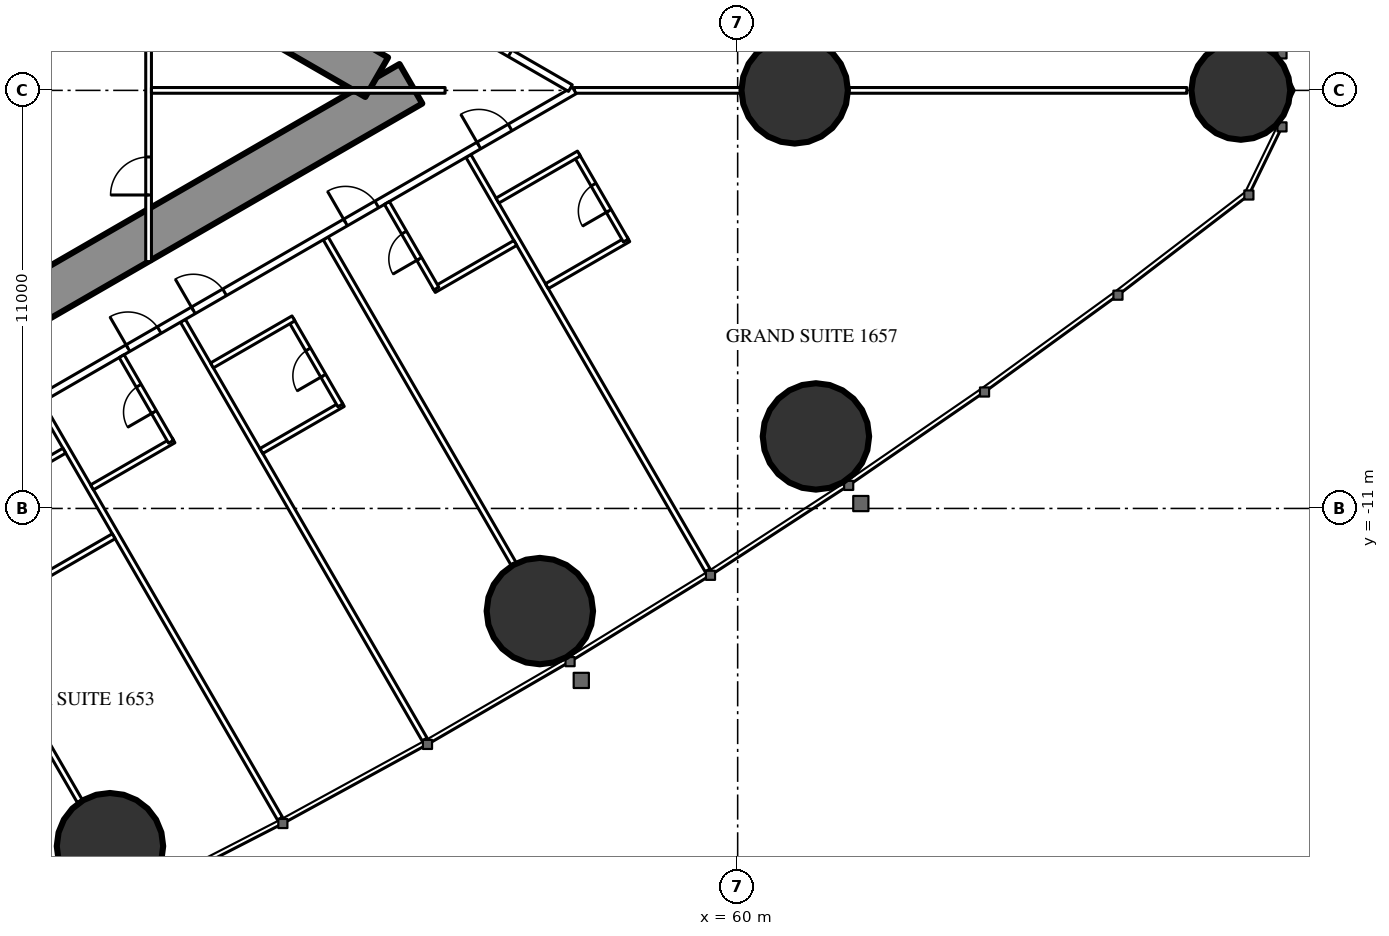
"""IFC4 building model, lengths in metres.
Left out: names, types, materials, properties, quantities, classifications, styles, units other than length and angle.
Written with IfcOpenShell. Run it as: python <this file> out.ifc"""

import sys

from ifc_helpers import new_model, si_unit, direction, frame, frame_2d, origin, origin_2d, place, context, subcontext, project, spatial, rectangle, hollow_circle, extrude, element, fill, save


model = new_model("IFC4")
c1 = context("Model", 3, precision=1e-05, world=origin(), true_north=direction((0.0, 1.0)))
c2 = subcontext(c1, "Body", "Model", "MODEL_VIEW")
j1 = project(units=[si_unit("LENGTHUNIT", "METRE"), si_unit("PLANEANGLEUNIT", "RADIAN")], contexts=[c1])
p1 = place(None, origin())
s1 = spatial("IfcSite", under=j1, at=p1, CompositionType="ELEMENT")
p2 = place(p1, origin())
s2 = spatial("IfcBuilding", under=s1, at=p2, CompositionType="ELEMENT")
p3 = place(p2, frame((0.0, 0.0, 63.5)))
s3 = spatial("IfcBuildingStorey", under=s2, at=p3, CompositionType="ELEMENT", Elevation=63.5)
p4 = place(p3, frame((73.239, 0.0, 0.0), z_axis=(0.0, 0.0, 1.0), x_axis=(1.0, 0.0, 0.0)))
e1 = element("IfcColumn", 1, at=p4, inside=s3, PredefinedType="COLUMN", context=c2, shape_type="SweptSolid", body=[
    extrude(hollow_circle(Radius=1.3, WallThickness=0.1, at=origin_2d()), origin(), (0.0, 0.0, 1.0), 3.5),
])
for number, where, z_axis, x_axis in (
    (2, (43.484, -19.886, 0.0), (0.0, 0.0, 1.0), (1.0, 0.0, 0.0)),
    (3, (54.795, -13.701, 0.0), (0.0, 0.0, 1.0), (1.0, 0.0, 0.0)),
    (4, (62.059, -9.105, 0.0), (0.0, 0.0, 1.0), (1.0, 0.0, 0.0)),
):
    element("IfcColumn", number, at=place(p3, frame(where, z_axis=z_axis, x_axis=x_axis)), inside=s3, PredefinedType="COLUMN", context=c2, shape_type="SweptSolid", body=[
        extrude(hollow_circle(Radius=1.4, WallThickness=0.12, at=origin_2d()), origin(), (0.0, 0.0, 1.0), 3.5),
    ])
p5 = place(p3, frame((61.5, 0.0, 0.0), z_axis=(0.0, 0.0, 1.0), x_axis=(1.0, 0.0, 0.0)))
e5 = element("IfcColumn", 5, at=p5, inside=s3, PredefinedType="COLUMN", context=c2, shape_type="SweptSolid", body=[
    extrude(hollow_circle(Radius=1.4, WallThickness=0.1, at=origin_2d()), origin(), (0.0, 0.0, 1.0), 3.5),
])
p6 = place(p3, frame((27.2, -13.8, 0.0), z_axis=(0.0, 0.0, 1.0), x_axis=(0.866027159892, 0.499996958321, 0.0)))
e6 = element("IfcWall", 6, at=p6, inside=s3, PredefinedType="SHEAR", context=c2, shape_type="SweptSolid", body=[
    extrude(rectangle(XDim=27.947, YDim=1.2, at=frame_2d((13.973, 0.0))), origin(), (0.0, 0.0, 1.0), 3.5),
])
p7 = place(p6, frame((4.6, 0.0, 0.0)))
e7 = element("IfcOpeningElement", 7, at=p7, cuts=e6, PredefinedType="OPENING", context=c2, shape_type="SweptSolid", body=[
    extrude(rectangle(XDim=1.0, YDim=2.2, at=frame_2d((0.5, 1.1))), frame((0.0, 0.61, 0.0), z_axis=(0.0, -1.0, 0.0), x_axis=(1.0, 0.0, 0.0)), (0.0, 0.0, 1.0), 1.22),
])
p8 = place(p6, frame((13.395, 0.0, 0.0)))
e8 = element("IfcOpeningElement", 8, at=p8, cuts=e6, PredefinedType="OPENING", context=c2, shape_type="SweptSolid", body=[
    extrude(rectangle(XDim=1.8, YDim=2.2, at=frame_2d((0.9, 1.1))), frame((0.0, 0.61, 0.0), z_axis=(0.0, -1.0, 0.0), x_axis=(1.0, 0.0, 0.0)), (0.0, 0.0, 1.0), 1.22),
])
p9 = place(p3, frame((27.2, 13.8, 0.0), z_axis=(0.0, 0.0, 1.0), x_axis=(0.866024515034, -0.500001539357, 0.0)))
e9 = element("IfcWall", 9, at=p9, inside=s3, PredefinedType="SHEAR", context=c2, shape_type="SweptSolid", body=[
    extrude(rectangle(XDim=26.907, YDim=1.2, at=frame_2d((13.454, 0.0))), origin(), (0.0, 0.0, 1.0), 3.5),
])
p10 = place(p9, frame((4.6, 0.0, 0.0)))
e10 = element("IfcOpeningElement", 10, at=p10, cuts=e9, PredefinedType="OPENING", context=c2, shape_type="SweptSolid", body=[
    extrude(rectangle(XDim=1.0, YDim=2.2, at=frame_2d((0.5, 1.1))), frame((0.0, 0.61, 0.0), z_axis=(0.0, -1.0, 0.0), x_axis=(1.0, 0.0, 0.0)), (0.0, 0.0, 1.0), 1.22),
])
p11 = place(p9, frame((13.395, 0.0, 0.0)))
e11 = element("IfcOpeningElement", 11, at=p11, cuts=e9, PredefinedType="OPENING", context=c2, shape_type="SweptSolid", body=[
    extrude(rectangle(XDim=1.8, YDim=2.2, at=frame_2d((0.9, 1.1))), frame((0.0, 0.61, 0.0), z_axis=(0.0, -1.0, 0.0), x_axis=(1.0, 0.0, 0.0)), (0.0, 0.0, 1.0), 1.22),
])
p12 = place(p3, frame((41.647, -8.23, 0.0), z_axis=(0.0, 0.0, 1.0), x_axis=(0.49998590462, -0.866033541603, 0.0)))
e12 = element("IfcWall", 12, at=p12, inside=s3, PredefinedType="PARTITIONING", context=c2, shape_type="SweptSolid", body=[
    extrude(rectangle(XDim=12.621, YDim=0.15, at=frame_2d((6.311, 0.0))), origin(), (0.0, 0.0, 1.0), 3.25),
])
p13 = place(p3, frame((45.403, -6.062, 0.0), z_axis=(0.0, 0.0, 1.0), x_axis=(0.500007077968, -0.866021317279, 0.0)))
e13 = element("IfcWall", 13, at=p13, inside=s3, PredefinedType="PARTITIONING", context=c2, shape_type="SweptSolid", body=[
    extrude(rectangle(XDim=12.721, YDim=0.15, at=frame_2d((6.361, 0.0))), origin(), (0.0, 0.0, 1.0), 3.25),
])
p14 = place(p3, frame((49.159, -3.893, 0.0), z_axis=(0.0, 0.0, 1.0), x_axis=(0.499998773722, -0.866026111775, 0.0)))
e14 = element("IfcWall", 14, at=p14, inside=s3, PredefinedType="PARTITIONING", context=c2, shape_type="SweptSolid", body=[
    extrude(rectangle(XDim=9.892, YDim=0.15, at=frame_2d((4.946, 0.0))), origin(), (0.0, 0.0, 1.0), 2.25),
])
p15 = place(p3, frame((52.915, -1.725, 0.0), z_axis=(0.0, 0.0, 1.0), x_axis=(0.499997163113, -0.866027041656, 0.0)))
e15 = element("IfcWall", 15, at=p15, inside=s3, PredefinedType="PARTITIONING", context=c2, shape_type="SweptSolid", body=[
    extrude(rectangle(XDim=12.591, YDim=0.15, at=frame_2d((6.295, 0.0))), origin(), (0.0, 0.0, 1.0), 3.25),
])
p16 = place(p3, frame((55.702, 0.0, 0.0), z_axis=(0.0, 0.0, 1.0), x_axis=(1.0, 0.0, 0.0)))
e16 = element("IfcWall", 16, at=p16, inside=s3, PredefinedType="PARTITIONING", context=c2, shape_type="SweptSolid", body=[
    extrude(rectangle(XDim=16.117, YDim=0.15, at=frame_2d((8.059, 0.0))), origin(), (0.0, 0.0, 1.0), 2.25),
])
p17 = place(p3, frame((40.57, -15.03, 0.0), z_axis=(0.0, 0.0, 1.0), x_axis=(0.500012993597, -0.866017901798, 0.0)))
e17 = element("IfcWall", 17, at=p17, inside=s3, PredefinedType="PARTITIONING", context=c2, shape_type="SweptSolid", body=[
    extrude(rectangle(XDim=4.243, YDim=0.15, at=frame_2d((2.122, 0.0))), origin(), (0.0, 0.0, 1.0), 3.25),
])
p18 = place(p3, frame((37.96, -10.243, 0.0), z_axis=(0.0, 0.0, 1.0), x_axis=(0.866026429433, 0.499998223521, 0.0)))
e18 = element("IfcWall", 18, at=p18, inside=s3, PredefinedType="PARTITIONING", context=c2, shape_type="SweptSolid", body=[
    extrude(rectangle(XDim=20.487, YDim=0.2, at=frame_2d((10.243, 0.0))), origin(), (0.0, 0.0, 1.0), 3.25),
])
p19 = place(p18, frame((6.925, 0.0, 0.0)))
e19 = element("IfcOpeningElement", 19, at=p19, cuts=e18, PredefinedType="OPENING", context=c2, shape_type="SweptSolid", body=[
    extrude(rectangle(XDim=0.95, YDim=2.2, at=frame_2d((0.475, 1.1))), frame((0.0, 0.11, 0.0), z_axis=(0.0, -1.0, 0.0), x_axis=(1.0, 0.0, 0.0)), (0.0, 0.0, 1.0), 0.22),
])
p20 = place(p18, frame((8.912, 0.0, 0.0)))
e20 = element("IfcOpeningElement", 20, at=p20, cuts=e18, PredefinedType="OPENING", context=c2, shape_type="SweptSolid", body=[
    extrude(rectangle(XDim=0.95, YDim=2.2, at=frame_2d((0.475, 1.1))), frame((0.0, 0.11, 0.0), z_axis=(0.0, -1.0, 0.0), x_axis=(1.0, 0.0, 0.0)), (0.0, 0.0, 1.0), 0.22),
])
p21 = place(p18, frame((13.535, 0.0, 0.0)))
e21 = element("IfcOpeningElement", 21, at=p21, cuts=e18, PredefinedType="OPENING", context=c2, shape_type="SweptSolid", body=[
    extrude(rectangle(XDim=0.95, YDim=2.2, at=frame_2d((0.475, 1.1))), frame((0.0, 0.11, 0.0), z_axis=(0.0, -1.0, 0.0), x_axis=(1.0, 0.0, 0.0)), (0.0, 0.0, 1.0), 0.22),
])
p22 = place(p18, frame((17.585, 0.0, 0.0)))
e22 = element("IfcOpeningElement", 22, at=p22, cuts=e18, PredefinedType="OPENING", context=c2, shape_type="SweptSolid", body=[
    extrude(rectangle(XDim=0.95, YDim=2.2, at=frame_2d((0.475, 1.1))), frame((0.0, 0.11, 0.0), z_axis=(0.0, -1.0, 0.0), x_axis=(1.0, 0.0, 0.0)), (0.0, 0.0, 1.0), 0.22),
])
p23 = place(p18, frame((2.875, 0.0, 0.0)))
e23 = element("IfcOpeningElement", 23, at=p23, cuts=e18, PredefinedType="OPENING", context=c2, shape_type="SweptSolid", body=[
    extrude(rectangle(XDim=0.95, YDim=2.2, at=frame_2d((0.475, 1.1))), frame((0.0, 0.11, 0.0), z_axis=(0.0, -1.0, 0.0), x_axis=(1.0, 0.0, 0.0)), (0.0, 0.0, 1.0), 0.22),
])
p24 = place(p3, frame((41.619, 8.131, 0.0), z_axis=(0.0, 0.0, 1.0), x_axis=(0.86603245327, -0.499987789734, 0.0)))
e24 = element("IfcWall", 24, at=p24, inside=s3, PredefinedType="PARTITIONING", context=c2, shape_type="SweptSolid", body=[
    extrude(rectangle(XDim=16.142, YDim=0.2, at=frame_2d((8.071, 0.0))), origin(), (0.0, 0.0, 1.0), 3.25),
])
p25 = place(p24, frame((13.36, 0.0, 0.0)))
e25 = element("IfcOpeningElement", 25, at=p25, cuts=e24, PredefinedType="OPENING", context=c2, shape_type="SweptSolid", body=[
    extrude(rectangle(XDim=0.95, YDim=2.2, at=frame_2d((0.475, 1.1))), frame((0.0, 0.11, 0.0), z_axis=(0.0, -1.0, 0.0), x_axis=(1.0, 0.0, 0.0)), (0.0, 0.0, 1.0), 0.22),
])
p26 = place(p24, frame((4.687, 0.0, 0.0)))
e26 = element("IfcOpeningElement", 26, at=p26, cuts=e24, PredefinedType="OPENING", context=c2, shape_type="SweptSolid", body=[
    extrude(rectangle(XDim=0.95, YDim=2.2, at=frame_2d((0.475, 1.1))), frame((0.0, 0.11, 0.0), z_axis=(0.0, -1.0, 0.0), x_axis=(1.0, 0.0, 0.0)), (0.0, 0.0, 1.0), 0.22),
])
p27 = place(p24, frame((2.987, 0.0, 0.0)))
e27 = element("IfcOpeningElement", 27, at=p27, cuts=e24, PredefinedType="OPENING", context=c2, shape_type="SweptSolid", body=[
    extrude(rectangle(XDim=0.95, YDim=2.2, at=frame_2d((0.475, 1.1))), frame((0.0, 0.11, 0.0), z_axis=(0.0, -1.0, 0.0), x_axis=(1.0, 0.0, 0.0)), (0.0, 0.0, 1.0), 0.22),
])
p28 = place(p3, frame((43.012, -10.444, 0.0), z_axis=(0.0, 0.0, 1.0), x_axis=(0.866031185235, 0.4999899861, 0.0)))
e28 = element("IfcWall", 28, at=p28, inside=s3, PredefinedType="PARTITIONING", context=c2, shape_type="SweptSolid", body=[
    extrude(rectangle(XDim=2.475, YDim=0.15, at=frame_2d((1.238, 0.0))), origin(), (0.0, 0.0, 1.0), 3.25),
])
p29 = place(p3, frame((43.791, -6.993, 0.0), z_axis=(0.0, 0.0, 1.0), x_axis=(0.500047596559, -0.865997922154, 0.0)))
e29 = element("IfcWall", 29, at=p29, inside=s3, PredefinedType="PARTITIONING", context=c2, shape_type="SweptSolid", body=[
    extrude(rectangle(XDim=2.6, YDim=0.15, at=frame_2d((1.3, 0.0))), origin(), (0.0, 0.0, 1.0), 3.25),
])
p30 = place(p29, frame((0.9, 0.0, 0.0)))
e30 = element("IfcOpeningElement", 30, at=p30, cuts=e29, PredefinedType="OPENING", context=c2, shape_type="SweptSolid", body=[
    extrude(rectangle(XDim=0.8, YDim=2.2, at=frame_2d((0.4, 1.1))), frame((0.0, 0.085, 0.0), z_axis=(0.0, -1.0, 0.0), x_axis=(1.0, 0.0, 0.0)), (0.0, 0.0, 1.0), 0.17),
])
p31 = place(p3, frame((47.468, -9.488, 0.0), z_axis=(0.0, 0.0, 1.0), x_axis=(0.86604923931, 0.499958713387, 0.0)))
e31 = element("IfcWall", 31, at=p31, inside=s3, PredefinedType="PARTITIONING", context=c2, shape_type="SweptSolid", body=[
    extrude(rectangle(XDim=2.475, YDim=0.15, at=frame_2d((1.237, 0.0))), origin(), (0.0, 0.0, 1.0), 3.25),
])
p32 = place(p3, frame((48.246, -6.037, 0.0), z_axis=(0.0, 0.0, 1.0), x_axis=(0.500006934395, -0.866021400173, 0.0)))
e32 = element("IfcWall", 32, at=p32, inside=s3, PredefinedType="PARTITIONING", context=c2, shape_type="SweptSolid", body=[
    extrude(rectangle(XDim=2.6, YDim=0.15, at=frame_2d((1.3, 0.0))), origin(), (0.0, 0.0, 1.0), 3.25),
])
p33 = place(p32, frame((0.9, 0.0, 0.0)))
e33 = element("IfcOpeningElement", 33, at=p33, cuts=e32, PredefinedType="OPENING", context=c2, shape_type="SweptSolid", body=[
    extrude(rectangle(XDim=0.8, YDim=2.2, at=frame_2d((0.4, 1.1))), frame((0.0, 0.085, 0.0), z_axis=(0.0, -1.0, 0.0), x_axis=(1.0, 0.0, 0.0)), (0.0, 0.0, 1.0), 0.17),
])
for number, where, z_axis, x_axis in (
    (34, (46.168, -7.237, 0.0), (0.0, 0.0, 1.0), (0.866, 0.5, 0.0)),
    (35, (52.006, -5.251, 0.0), (0.0, 0.0, 1.0), (0.866, 0.5, 0.0)),
):
    element("IfcWall", number, at=place(p3, frame(where, z_axis=z_axis, x_axis=x_axis)), inside=s3, PredefinedType="PARTITIONING", context=c2, shape_type="SweptSolid", body=[
        extrude(rectangle(XDim=2.475, YDim=0.15, at=frame_2d((1.237, 0.0))), origin(), (0.0, 0.0, 1.0), 3.25),
    ])
p34 = place(p3, frame((50.771, -2.962, 0.0), z_axis=(0.0, 0.0, 1.0), x_axis=(0.500006934395, -0.866021400173, 0.0)))
e36 = element("IfcWall", 36, at=p34, inside=s3, PredefinedType="PARTITIONING", context=c2, shape_type="SweptSolid", body=[
    extrude(rectangle(XDim=2.6, YDim=0.15, at=frame_2d((1.3, 0.0))), origin(), (0.0, 0.0, 1.0), 3.25),
])
p35 = place(p34, frame((0.9, 0.0, 0.0)))
e37 = element("IfcOpeningElement", 37, at=p35, cuts=e36, PredefinedType="OPENING", context=c2, shape_type="SweptSolid", body=[
    extrude(rectangle(XDim=0.8, YDim=2.2, at=frame_2d((0.4, 1.1))), frame((0.0, 0.085, 0.0), z_axis=(0.0, -1.0, 0.0), x_axis=(1.0, 0.0, 0.0)), (0.0, 0.0, 1.0), 0.17),
])
p36 = place(p3, frame((54.98, -5.151, 0.0), z_axis=(0.0, 0.0, 1.0), x_axis=(0.86604923931, 0.499958713387, 0.0)))
e38 = element("IfcWall", 38, at=p36, inside=s3, PredefinedType="PARTITIONING", context=c2, shape_type="SweptSolid", body=[
    extrude(rectangle(XDim=2.475, YDim=0.15, at=frame_2d((1.237, 0.0))), origin(), (0.0, 0.0, 1.0), 3.25),
])
p37 = place(p3, frame((55.758, -1.7, 0.0), z_axis=(0.0, 0.0, 1.0), x_axis=(0.500006934395, -0.866021400173, 0.0)))
e39 = element("IfcWall", 39, at=p37, inside=s3, PredefinedType="PARTITIONING", context=c2, shape_type="SweptSolid", body=[
    extrude(rectangle(XDim=2.6, YDim=0.15, at=frame_2d((1.3, 0.0))), origin(), (0.0, 0.0, 1.0), 3.25),
])
p38 = place(p37, frame((0.9, 0.0, 0.0)))
e40 = element("IfcOpeningElement", 40, at=p38, cuts=e39, PredefinedType="OPENING", context=c2, shape_type="SweptSolid", body=[
    extrude(rectangle(XDim=0.8, YDim=2.2, at=frame_2d((0.4, 1.1))), frame((0.0, 0.085, 0.0), z_axis=(0.0, -1.0, 0.0), x_axis=(1.0, 0.0, 0.0)), (0.0, 0.0, 1.0), 0.17),
])
p39 = place(p3, frame((53.68, -2.9, 0.0), z_axis=(0.0, 0.0, 1.0), x_axis=(0.866006523861, 0.500032699561, 0.0)))
e41 = element("IfcWall", 41, at=p39, inside=s3, PredefinedType="PARTITIONING", context=c2, shape_type="SweptSolid", body=[
    extrude(rectangle(XDim=2.475, YDim=0.15, at=frame_2d((1.237, 0.0))), origin(), (0.0, 0.0, 1.0), 3.25),
])
for number, where, z_axis, x_axis in (
    (42, (41.439, -12.969, 0.0), (0.0, 0.0, 1.0), (0.866, 0.5, 0.0)),
    (43, (40.139, -10.718, 0.0), (0.0, 0.0, 1.0), (0.866, 0.5, 0.0)),
):
    element("IfcWall", number, at=place(p3, frame(where, z_axis=z_axis, x_axis=x_axis)), inside=s3, PredefinedType="PARTITIONING", context=c2, shape_type="SweptSolid", body=[
        extrude(rectangle(XDim=2.475, YDim=0.15, at=frame_2d((1.238, 0.0))), origin(), (0.0, 0.0, 1.0), 3.25),
    ])
p40 = place(p3, frame((44.5, -4.505, 0.0), z_axis=(0.0, 0.0, 1.0), x_axis=(0.0, 1.0, 0.0)))
e44 = element("IfcWall", 44, at=p40, inside=s3, PredefinedType="PARTITIONING", context=c2, shape_type="SweptSolid", body=[
    extrude(rectangle(XDim=9.009, YDim=0.15, at=frame_2d((4.505, 0.0))), origin(), (0.0, 0.0, 1.0), 2.45),
])
p41 = place(p40, frame((1.752, 0.0, 0.0)))
e45 = element("IfcOpeningElement", 45, at=p41, cuts=e44, PredefinedType="OPENING", context=c2, shape_type="SweptSolid", body=[
    extrude(rectangle(XDim=1.0, YDim=2.2, at=frame_2d((0.5, 1.1))), frame((0.0, 0.085, 0.0), z_axis=(0.0, -1.0, 0.0), x_axis=(1.0, 0.0, 0.0)), (0.0, 0.0, 1.0), 0.17),
])
p42 = place(p40, frame((6.257, 0.0, 0.0)))
e46 = element("IfcOpeningElement", 46, at=p42, cuts=e44, PredefinedType="OPENING", context=c2, shape_type="SweptSolid", body=[
    extrude(rectangle(XDim=1.0, YDim=2.2, at=frame_2d((0.5, 1.1))), frame((0.0, 0.085, 0.0), z_axis=(0.0, -1.0, 0.0), x_axis=(1.0, 0.0, 0.0)), (0.0, 0.0, 1.0), 0.17),
])
p43 = place(p3, frame((44.575, 0.0, 0.0), z_axis=(0.0, 0.0, 1.0), x_axis=(1.0, 0.0, 0.0)))
e47 = element("IfcWall", 47, at=p43, inside=s3, PredefinedType="PARTITIONING", context=c2, shape_type="SweptSolid", body=[
    extrude(rectangle(XDim=7.727, YDim=0.15, at=frame_2d((3.864, 0.0))), origin(), (0.0, 0.0, 1.0), 2.25),
])
p44 = place(p30, origin())
e48 = element("IfcDoor", 48, at=p44, inside=s3, OperationType="SINGLE_SWING_RIGHT", PredefinedType="DOOR", context=c2, shape_type="SweptSolid", body=[
    extrude(rectangle(XDim=0.8, YDim=2.2, at=frame_2d((0.4, 1.1))), frame((0.0, 0.025, 0.0), z_axis=(0.0, -1.0, 0.0), x_axis=(1.0, 0.0, 0.0)), (0.0, 0.0, 1.0), 0.05),
])
fill(e30, e48)
p45 = place(p19, origin())
e49 = element("IfcDoor", 49, at=p45, inside=s3, OperationType="SINGLE_SWING_LEFT", PredefinedType="DOOR", context=c2, shape_type="SweptSolid", body=[
    extrude(rectangle(XDim=0.95, YDim=2.2, at=frame_2d((0.475, 1.1))), frame((0.0, 0.025, 0.0), z_axis=(0.0, -1.0, 0.0), x_axis=(1.0, 0.0, 0.0)), (0.0, 0.0, 1.0), 0.05),
])
fill(e19, e49)
p46 = place(p33, origin())
e50 = element("IfcDoor", 50, at=p46, inside=s3, OperationType="SINGLE_SWING_RIGHT", PredefinedType="DOOR", context=c2, shape_type="SweptSolid", body=[
    extrude(rectangle(XDim=0.8, YDim=2.2, at=frame_2d((0.4, 1.1))), frame((0.0, 0.025, 0.0), z_axis=(0.0, -1.0, 0.0), x_axis=(1.0, 0.0, 0.0)), (0.0, 0.0, 1.0), 0.05),
])
fill(e33, e50)
p47 = place(p20, origin())
e51 = element("IfcDoor", 51, at=p47, inside=s3, OperationType="SINGLE_SWING_LEFT", PredefinedType="DOOR", context=c2, shape_type="SweptSolid", body=[
    extrude(rectangle(XDim=0.95, YDim=2.2, at=frame_2d((0.475, 1.1))), frame((0.0, 0.025, 0.0), z_axis=(0.0, -1.0, 0.0), x_axis=(1.0, 0.0, 0.0)), (0.0, 0.0, 1.0), 0.05),
])
fill(e20, e51)
p48 = place(p35, origin())
e52 = element("IfcDoor", 52, at=p48, inside=s3, OperationType="SINGLE_SWING_RIGHT", PredefinedType="DOOR", context=c2, shape_type="SweptSolid", body=[
    extrude(rectangle(XDim=0.8, YDim=2.2, at=frame_2d((0.4, 1.1))), frame((0.0, 0.025, 0.0), z_axis=(0.0, -1.0, 0.0), x_axis=(1.0, 0.0, 0.0)), (0.0, 0.0, 1.0), 0.05),
])
fill(e37, e52)
p49 = place(p21, origin())
e53 = element("IfcDoor", 53, at=p49, inside=s3, OperationType="SINGLE_SWING_LEFT", PredefinedType="DOOR", context=c2, shape_type="SweptSolid", body=[
    extrude(rectangle(XDim=0.95, YDim=2.2, at=frame_2d((0.475, 1.1))), frame((0.0, 0.025, 0.0), z_axis=(0.0, -1.0, 0.0), x_axis=(1.0, 0.0, 0.0)), (0.0, 0.0, 1.0), 0.05),
])
fill(e21, e53)
p50 = place(p38, origin())
e54 = element("IfcDoor", 54, at=p50, inside=s3, OperationType="SINGLE_SWING_RIGHT", PredefinedType="DOOR", context=c2, shape_type="SweptSolid", body=[
    extrude(rectangle(XDim=0.8, YDim=2.2, at=frame_2d((0.4, 1.1))), frame((0.0, 0.025, 0.0), z_axis=(0.0, -1.0, 0.0), x_axis=(1.0, 0.0, 0.0)), (0.0, 0.0, 1.0), 0.05),
])
fill(e40, e54)
p51 = place(p22, origin())
e55 = element("IfcDoor", 55, at=p51, inside=s3, OperationType="SINGLE_SWING_LEFT", PredefinedType="DOOR", context=c2, shape_type="SweptSolid", body=[
    extrude(rectangle(XDim=0.95, YDim=2.2, at=frame_2d((0.475, 1.1))), frame((0.0, 0.025, 0.0), z_axis=(0.0, -1.0, 0.0), x_axis=(1.0, 0.0, 0.0)), (0.0, 0.0, 1.0), 0.05),
])
fill(e22, e55)
p52 = place(p25, origin())
e56 = element("IfcDoor", 56, at=p52, inside=s3, OperationType="SINGLE_SWING_LEFT", PredefinedType="DOOR", context=c2, shape_type="SweptSolid", body=[
    extrude(rectangle(XDim=0.95, YDim=2.2, at=frame_2d((0.475, 1.1))), frame((0.0, 0.025, 0.0), z_axis=(0.0, -1.0, 0.0), x_axis=(1.0, 0.0, 0.0)), (0.0, 0.0, 1.0), 0.05),
])
fill(e25, e56)
p53 = place(p41, origin())
e57 = element("IfcDoor", 57, at=p53, inside=s3, OperationType="SINGLE_SWING_LEFT", PredefinedType="DOOR", context=c2, shape_type="SweptSolid", body=[
    extrude(rectangle(XDim=1.0, YDim=2.2, at=frame_2d((0.5, 1.1))), frame((0.0, 0.025, 0.0), z_axis=(0.0, -1.0, 0.0), x_axis=(1.0, 0.0, 0.0)), (0.0, 0.0, 1.0), 0.05),
])
fill(e45, e57)
save(model, sys.argv[1])
